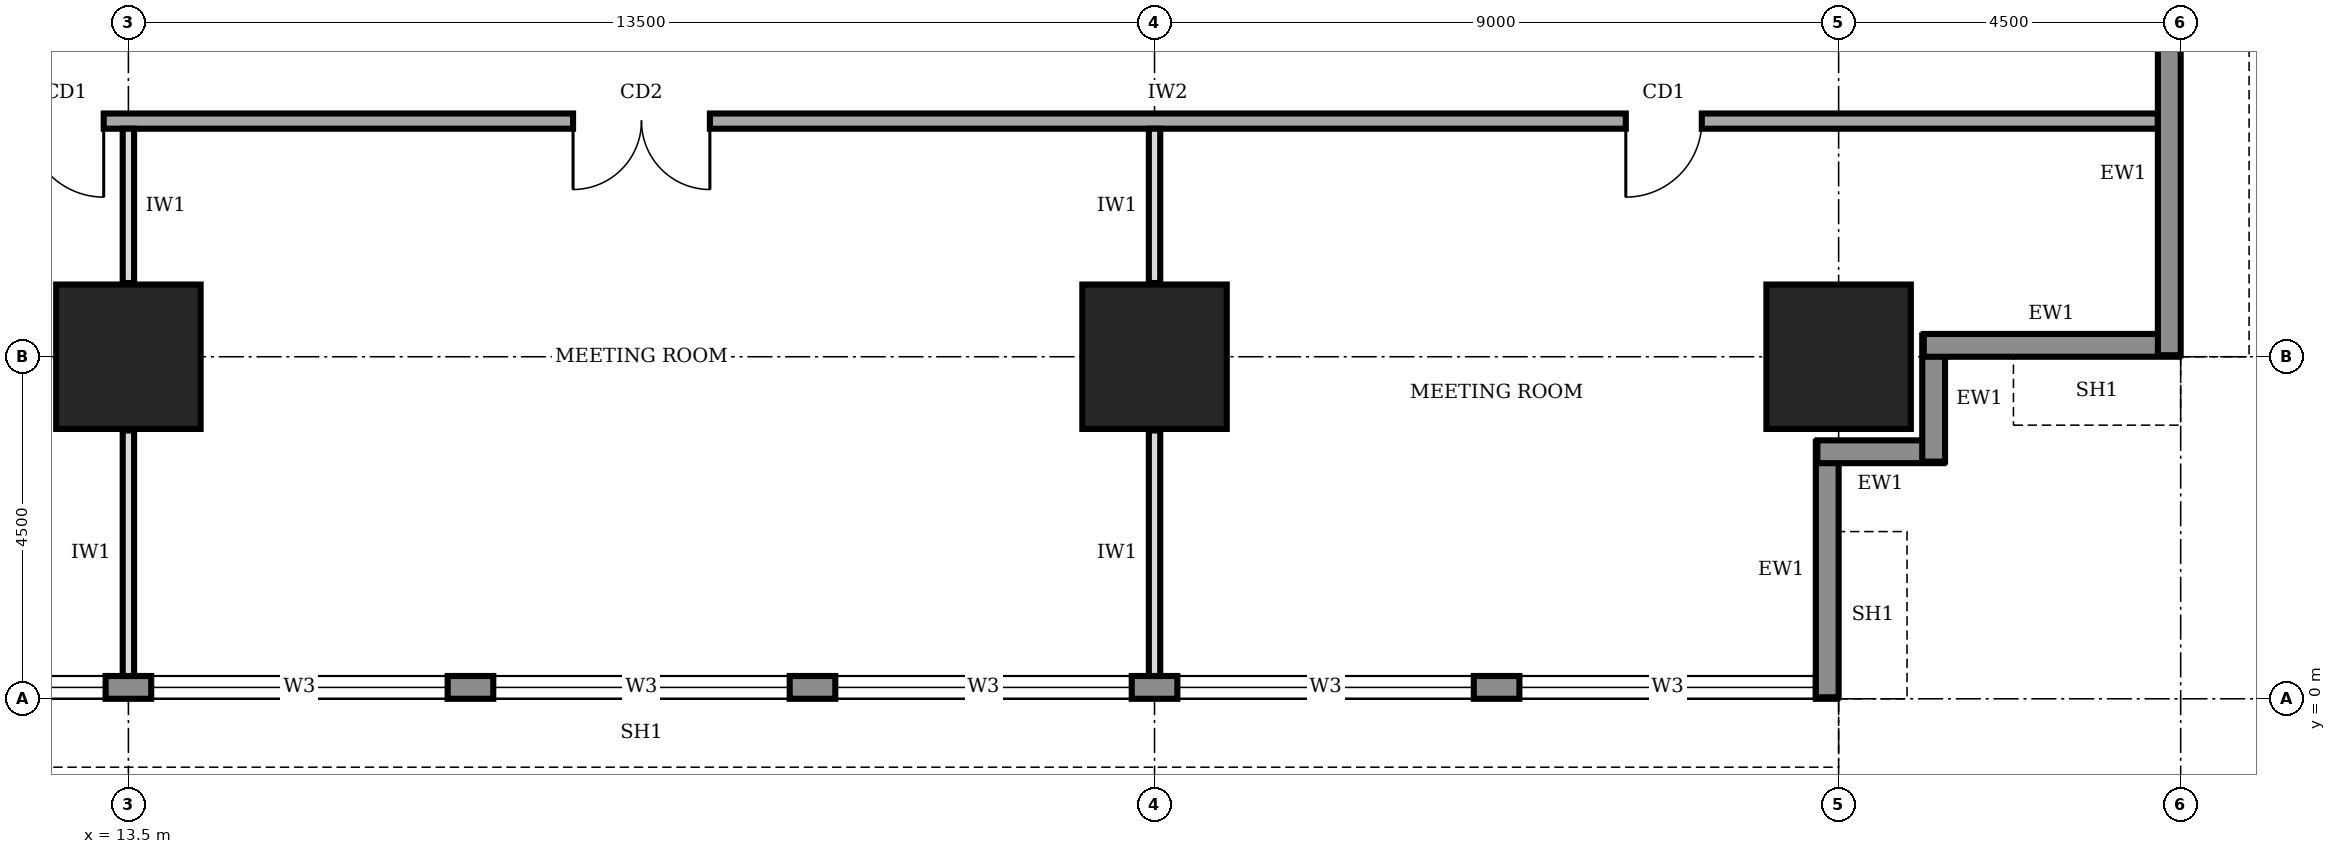
"""IFC4 building model, lengths in metres.
Left out: names, types, materials, properties, quantities, classifications, styles, units other than length and angle.
Written with IfcOpenShell. Run it as: python <this file> out.ifc"""

import sys

from ifc_helpers import new_model, si_unit, direction, frame, frame_2d, origin, origin_2d, place, context, subcontext, project, spatial, rectangle, extrude, element, fill, save


model = new_model("IFC4")
c1 = context("Model", 3, precision=1e-05, world=origin(), true_north=direction((0.0, 1.0)))
c2 = subcontext(c1, "Body", "Model", "MODEL_VIEW")
j1 = project(units=[si_unit("LENGTHUNIT", "METRE"), si_unit("PLANEANGLEUNIT", "RADIAN")], contexts=[c1])
p1 = place(None, origin())
s1 = spatial("IfcSite", under=j1, at=p1, CompositionType="ELEMENT")
p2 = place(p1, origin())
s2 = spatial("IfcBuilding", under=s1, at=p2, CompositionType="ELEMENT")
p3 = place(p2, frame((0.0, 0.0, 85.0)))
s3 = spatial("IfcBuildingStorey", under=s2, at=p3, CompositionType="ELEMENT", Elevation=85.0)
for number, where, z_axis, x_axis in (
    (1, (13.5, 4.5, 0.0), (0.0, 0.0, 1.0), (1.0, 0.0, 0.0)),
    (2, (27.0, 4.5, 0.0), (0.0, 0.0, 1.0), (1.0, 0.0, 0.0)),
    (3, (36.0, 4.5, 0.0), (0.0, 0.0, 1.0), (1.0, 0.0, 0.0)),
):
    element("IfcColumn", number, at=place(p3, frame(where, z_axis=z_axis, x_axis=x_axis)), inside=s3, PredefinedType="COLUMN", context=c2, shape_type="SweptSolid", body=[
        extrude(rectangle(XDim=1.9, YDim=1.9, at=origin_2d()), origin(), (0.0, 0.0, 1.0), 4.0),
    ])
p4 = place(p3, frame((4.52, 0.15, 0.0), z_axis=(0.0, 0.0, 1.0), x_axis=(1.0, 0.0, 0.0)))
e4 = element("IfcWall", 4, at=p4, inside=s3, PredefinedType="STANDARD", context=c2, shape_type="SweptSolid", body=[
    extrude(rectangle(XDim=31.46, YDim=0.3, at=frame_2d((15.73, 0.0))), origin(), (0.0, 0.0, 1.0), 3.75),
])
p5 = place(p4, frame((4.78, 0.0, 0.95)))
e5 = element("IfcOpeningElement", 5, at=p5, cuts=e4, PredefinedType="OPENING", context=c2, shape_type="SweptSolid", body=[
    extrude(rectangle(XDim=3.9, YDim=1.8, at=frame_2d((1.95, 0.9))), frame((0.0, 0.16, 0.0), z_axis=(0.0, -1.0, 0.0), x_axis=(1.0, 0.0, 0.0)), (0.0, 0.0, 1.0), 0.32),
])
p6 = place(p4, frame((9.28, 0.0, 0.95)))
e6 = element("IfcOpeningElement", 6, at=p6, cuts=e4, PredefinedType="OPENING", context=c2, shape_type="SweptSolid", body=[
    extrude(rectangle(XDim=3.9, YDim=1.8, at=frame_2d((1.95, 0.9))), frame((0.0, 0.16, 0.0), z_axis=(0.0, -1.0, 0.0), x_axis=(1.0, 0.0, 0.0)), (0.0, 0.0, 1.0), 0.32),
])
p7 = place(p4, frame((13.78, 0.0, 0.95)))
e7 = element("IfcOpeningElement", 7, at=p7, cuts=e4, PredefinedType="OPENING", context=c2, shape_type="SweptSolid", body=[
    extrude(rectangle(XDim=3.9, YDim=1.8, at=frame_2d((1.95, 0.9))), frame((0.0, 0.16, 0.0), z_axis=(0.0, -1.0, 0.0), x_axis=(1.0, 0.0, 0.0)), (0.0, 0.0, 1.0), 0.32),
])
p8 = place(p4, frame((18.28, 0.0, 0.95)))
e8 = element("IfcOpeningElement", 8, at=p8, cuts=e4, PredefinedType="OPENING", context=c2, shape_type="SweptSolid", body=[
    extrude(rectangle(XDim=3.9, YDim=1.8, at=frame_2d((1.95, 0.9))), frame((0.0, 0.16, 0.0), z_axis=(0.0, -1.0, 0.0), x_axis=(1.0, 0.0, 0.0)), (0.0, 0.0, 1.0), 0.32),
])
p9 = place(p4, frame((22.78, 0.0, 0.95)))
e9 = element("IfcOpeningElement", 9, at=p9, cuts=e4, PredefinedType="OPENING", context=c2, shape_type="SweptSolid", body=[
    extrude(rectangle(XDim=3.9, YDim=1.8, at=frame_2d((1.95, 0.9))), frame((0.0, 0.16, 0.0), z_axis=(0.0, -1.0, 0.0), x_axis=(1.0, 0.0, 0.0)), (0.0, 0.0, 1.0), 0.32),
])
p10 = place(p4, frame((27.28, 0.0, 0.95)))
e10 = element("IfcOpeningElement", 10, at=p10, cuts=e4, PredefinedType="OPENING", context=c2, shape_type="SweptSolid", body=[
    extrude(rectangle(XDim=3.9, YDim=1.8, at=frame_2d((1.95, 0.9))), frame((0.0, 0.16, 0.0), z_axis=(0.0, -1.0, 0.0), x_axis=(1.0, 0.0, 0.0)), (0.0, 0.0, 1.0), 0.32),
])
p11 = place(p3, frame((35.85, 0.02, 0.0), z_axis=(0.0, 0.0, 1.0), x_axis=(0.0, 1.0, 0.0)))
e11 = element("IfcWall", 11, at=p11, inside=s3, PredefinedType="STANDARD", context=c2, shape_type="SweptSolid", body=[
    extrude(rectangle(XDim=3.36, YDim=0.3, at=frame_2d((1.68, 0.0))), origin(), (0.0, 0.0, 1.0), 2.85),
])
for number, where, z_axis, x_axis in (
    (12, (35.72, 3.25, 0.0), (0.0, 0.0, 1.0), (1.0, 0.0, 0.0)),
    (13, (37.25, 3.12, 0.0), (0.0, 0.0, 1.0), (0.0, 1.0, 0.0)),
):
    element("IfcWall", number, at=place(p3, frame(where, z_axis=z_axis, x_axis=x_axis)), inside=s3, PredefinedType="STANDARD", context=c2, shape_type="SweptSolid", body=[
        extrude(rectangle(XDim=1.66, YDim=0.3, at=frame_2d((0.83, 0.0))), origin(), (0.0, 0.0, 1.0), 3.75),
    ])
p12 = place(p3, frame((37.12, 4.65, 0.0), z_axis=(0.0, 0.0, 1.0), x_axis=(1.0, 0.0, 0.0)))
e14 = element("IfcWall", 14, at=p12, inside=s3, PredefinedType="STANDARD", context=c2, shape_type="SweptSolid", body=[
    extrude(rectangle(XDim=3.36, YDim=0.3, at=frame_2d((1.68, 0.0))), origin(), (0.0, 0.0, 1.0), 2.85),
])
p13 = place(p3, frame((40.35, 4.52, 0.0), z_axis=(0.0, 0.0, 1.0), x_axis=(0.0, 1.0, 0.0)))
e15 = element("IfcWall", 15, at=p13, inside=s3, PredefinedType="STANDARD", context=c2, shape_type="SweptSolid", body=[
    extrude(rectangle(XDim=31.46, YDim=0.3, at=frame_2d((15.73, 0.0))), origin(), (0.0, 0.0, 1.0), 3.75),
])
p14 = place(p13, frame((4.78, 0.0, 0.95)))
e16 = element("IfcOpeningElement", 16, at=p14, cuts=e15, PredefinedType="OPENING", context=c2, shape_type="SweptSolid", body=[
    extrude(rectangle(XDim=3.9, YDim=1.8, at=frame_2d((1.95, 0.9))), frame((0.0, 0.16, 0.0), z_axis=(0.0, -1.0, 0.0), x_axis=(1.0, 0.0, 0.0)), (0.0, 0.0, 1.0), 0.32),
])
p15 = place(p13, frame((9.28, 0.0, 0.95)))
e17 = element("IfcOpeningElement", 17, at=p15, cuts=e15, PredefinedType="OPENING", context=c2, shape_type="SweptSolid", body=[
    extrude(rectangle(XDim=3.9, YDim=1.8, at=frame_2d((1.95, 0.9))), frame((0.0, 0.16, 0.0), z_axis=(0.0, -1.0, 0.0), x_axis=(1.0, 0.0, 0.0)), (0.0, 0.0, 1.0), 0.32),
])
p16 = place(p13, frame((13.78, 0.0, 0.95)))
e18 = element("IfcOpeningElement", 18, at=p16, cuts=e15, PredefinedType="OPENING", context=c2, shape_type="SweptSolid", body=[
    extrude(rectangle(XDim=3.9, YDim=1.8, at=frame_2d((1.95, 0.9))), frame((0.0, 0.16, 0.0), z_axis=(0.0, -1.0, 0.0), x_axis=(1.0, 0.0, 0.0)), (0.0, 0.0, 1.0), 0.32),
])
p17 = place(p13, frame((18.28, 0.0, 0.95)))
e19 = element("IfcOpeningElement", 19, at=p17, cuts=e15, PredefinedType="OPENING", context=c2, shape_type="SweptSolid", body=[
    extrude(rectangle(XDim=3.9, YDim=1.8, at=frame_2d((1.95, 0.9))), frame((0.0, 0.16, 0.0), z_axis=(0.0, -1.0, 0.0), x_axis=(1.0, 0.0, 0.0)), (0.0, 0.0, 1.0), 0.32),
])
p18 = place(p13, frame((22.78, 0.0, 0.95)))
e20 = element("IfcOpeningElement", 20, at=p18, cuts=e15, PredefinedType="OPENING", context=c2, shape_type="SweptSolid", body=[
    extrude(rectangle(XDim=3.9, YDim=1.8, at=frame_2d((1.95, 0.9))), frame((0.0, 0.16, 0.0), z_axis=(0.0, -1.0, 0.0), x_axis=(1.0, 0.0, 0.0)), (0.0, 0.0, 1.0), 0.32),
])
p19 = place(p13, frame((27.28, 0.0, 0.95)))
e21 = element("IfcOpeningElement", 21, at=p19, cuts=e15, PredefinedType="OPENING", context=c2, shape_type="SweptSolid", body=[
    extrude(rectangle(XDim=3.9, YDim=1.8, at=frame_2d((1.95, 0.9))), frame((0.0, 0.16, 0.0), z_axis=(0.0, -1.0, 0.0), x_axis=(1.0, 0.0, 0.0)), (0.0, 0.0, 1.0), 0.32),
])
p20 = place(p3, frame((11.9, 7.6, 0.0), z_axis=(0.0, 0.0, 1.0), x_axis=(1.0, 0.0, 0.0)))
e22 = element("IfcWall", 22, at=p20, inside=s3, PredefinedType="SOLIDWALL", context=c2, shape_type="SweptSolid", body=[
    extrude(rectangle(XDim=28.3, YDim=0.2, at=frame_2d((14.15, 0.0))), origin(), (0.0, 0.0, 1.0), 3.75),
])
p21 = place(p20, frame((0.275, 0.0, 0.0)))
e23 = element("IfcOpeningElement", 23, at=p21, cuts=e22, PredefinedType="OPENING", context=c2, shape_type="SweptSolid", body=[
    extrude(rectangle(XDim=1.0, YDim=2.1, at=frame_2d((0.5, 1.05))), frame((0.0, 0.11, 0.0), z_axis=(0.0, -1.0, 0.0), x_axis=(1.0, 0.0, 0.0)), (0.0, 0.0, 1.0), 0.22),
])
p22 = place(p20, frame((7.45, 0.0, 0.0)))
e24 = element("IfcOpeningElement", 24, at=p22, cuts=e22, PredefinedType="OPENING", context=c2, shape_type="SweptSolid", body=[
    extrude(rectangle(XDim=1.8, YDim=2.1, at=frame_2d((0.9, 1.05))), frame((0.0, 0.11, 0.0), z_axis=(0.0, -1.0, 0.0), x_axis=(1.0, 0.0, 0.0)), (0.0, 0.0, 1.0), 0.22),
])
p23 = place(p20, frame((21.3, 0.0, 0.0)))
e25 = element("IfcOpeningElement", 25, at=p23, cuts=e22, PredefinedType="OPENING", context=c2, shape_type="SweptSolid", body=[
    extrude(rectangle(XDim=1.0, YDim=2.1, at=frame_2d((0.5, 1.05))), frame((0.0, 0.11, 0.0), z_axis=(0.0, -1.0, 0.0), x_axis=(1.0, 0.0, 0.0)), (0.0, 0.0, 1.0), 0.22),
])
p24 = place(p3, frame((13.5, 0.3, 0.0), z_axis=(0.0, 0.0, 1.0), x_axis=(0.0, 1.0, 0.0)))
e26 = element("IfcWall", 26, at=p24, inside=s3, PredefinedType="PARTITIONING", context=c2, shape_type="SweptSolid", body=[
    extrude(rectangle(XDim=3.23, YDim=0.15, at=frame_2d((1.615, 0.0))), origin(), (0.0, 0.0, 1.0), 2.85),
])
p25 = place(p3, frame((13.5, 5.47, 0.0), z_axis=(0.0, 0.0, 1.0), x_axis=(0.0, 1.0, 0.0)))
e27 = element("IfcWall", 27, at=p25, inside=s3, PredefinedType="PARTITIONING", context=c2, shape_type="SweptSolid", body=[
    extrude(rectangle(XDim=2.03, YDim=0.15, at=frame_2d((1.015, 0.0))), origin(), (0.0, 0.0, 1.0), 2.85),
])
p26 = place(p3, frame((27.0, 0.3, 0.0), z_axis=(0.0, 0.0, 1.0), x_axis=(0.0, 1.0, 0.0)))
e28 = element("IfcWall", 28, at=p26, inside=s3, PredefinedType="PARTITIONING", context=c2, shape_type="SweptSolid", body=[
    extrude(rectangle(XDim=3.23, YDim=0.15, at=frame_2d((1.615, 0.0))), origin(), (0.0, 0.0, 1.0), 2.85),
])
p27 = place(p3, frame((27.0, 5.47, 0.0), z_axis=(0.0, 0.0, 1.0), x_axis=(0.0, 1.0, 0.0)))
e29 = element("IfcWall", 29, at=p27, inside=s3, PredefinedType="PARTITIONING", context=c2, shape_type="SweptSolid", body=[
    extrude(rectangle(XDim=2.03, YDim=0.15, at=frame_2d((1.015, 0.0))), origin(), (0.0, 0.0, 1.0), 2.85),
])
p28 = place(p5, origin())
e30 = element("IfcWindow", 30, at=p28, inside=s3, PartitioningType="SINGLE_PANEL", PredefinedType="WINDOW", context=c2, shape_type="SweptSolid", body=[
    extrude(rectangle(XDim=3.9, YDim=1.8, at=frame_2d((1.95, 0.9))), frame((0.0, 0.03, 0.0), z_axis=(0.0, -1.0, 0.0), x_axis=(1.0, 0.0, 0.0)), (0.0, 0.0, 1.0), 0.06),
])
fill(e5, e30)
p29 = place(p6, origin())
e31 = element("IfcWindow", 31, at=p29, inside=s3, PartitioningType="SINGLE_PANEL", PredefinedType="WINDOW", context=c2, shape_type="SweptSolid", body=[
    extrude(rectangle(XDim=3.9, YDim=1.8, at=frame_2d((1.95, 0.9))), frame((0.0, 0.03, 0.0), z_axis=(0.0, -1.0, 0.0), x_axis=(1.0, 0.0, 0.0)), (0.0, 0.0, 1.0), 0.06),
])
fill(e6, e31)
p30 = place(p7, origin())
e32 = element("IfcWindow", 32, at=p30, inside=s3, PartitioningType="SINGLE_PANEL", PredefinedType="WINDOW", context=c2, shape_type="SweptSolid", body=[
    extrude(rectangle(XDim=3.9, YDim=1.8, at=frame_2d((1.95, 0.9))), frame((0.0, 0.03, 0.0), z_axis=(0.0, -1.0, 0.0), x_axis=(1.0, 0.0, 0.0)), (0.0, 0.0, 1.0), 0.06),
])
fill(e7, e32)
p31 = place(p8, origin())
e33 = element("IfcWindow", 33, at=p31, inside=s3, PartitioningType="SINGLE_PANEL", PredefinedType="WINDOW", context=c2, shape_type="SweptSolid", body=[
    extrude(rectangle(XDim=3.9, YDim=1.8, at=frame_2d((1.95, 0.9))), frame((0.0, 0.03, 0.0), z_axis=(0.0, -1.0, 0.0), x_axis=(1.0, 0.0, 0.0)), (0.0, 0.0, 1.0), 0.06),
])
fill(e8, e33)
p32 = place(p9, origin())
e34 = element("IfcWindow", 34, at=p32, inside=s3, PartitioningType="SINGLE_PANEL", PredefinedType="WINDOW", context=c2, shape_type="SweptSolid", body=[
    extrude(rectangle(XDim=3.9, YDim=1.8, at=frame_2d((1.95, 0.9))), frame((0.0, 0.03, 0.0), z_axis=(0.0, -1.0, 0.0), x_axis=(1.0, 0.0, 0.0)), (0.0, 0.0, 1.0), 0.06),
])
fill(e9, e34)
p33 = place(p10, origin())
e35 = element("IfcWindow", 35, at=p33, inside=s3, PartitioningType="SINGLE_PANEL", PredefinedType="WINDOW", context=c2, shape_type="SweptSolid", body=[
    extrude(rectangle(XDim=3.9, YDim=1.8, at=frame_2d((1.95, 0.9))), frame((0.0, 0.03, 0.0), z_axis=(0.0, -1.0, 0.0), x_axis=(1.0, 0.0, 0.0)), (0.0, 0.0, 1.0), 0.06),
])
fill(e10, e35)
p34 = place(p21, frame((1.0, 0.0, 0.0), z_axis=(0.0, 0.0, 1.0), x_axis=(-1.0, 0.0, 0.0)))
e36 = element("IfcDoor", 36, at=p34, inside=s3, OperationType="SINGLE_SWING_LEFT", PredefinedType="DOOR", context=c2, shape_type="SweptSolid", body=[
    extrude(rectangle(XDim=1.0, YDim=2.1, at=frame_2d((0.5, 1.05))), frame((0.0, 0.025, 0.0), z_axis=(0.0, -1.0, 0.0), x_axis=(1.0, 0.0, 0.0)), (0.0, 0.0, 1.0), 0.05),
])
fill(e23, e36)
p35 = place(p22, frame((1.8, 0.0, 0.0), z_axis=(0.0, 0.0, 1.0), x_axis=(-1.0, 0.0, 0.0)))
e37 = element("IfcDoor", 37, at=p35, inside=s3, OperationType="DOUBLE_DOOR_SINGLE_SWING", PredefinedType="DOOR", context=c2, shape_type="SweptSolid", body=[
    extrude(rectangle(XDim=1.8, YDim=2.1, at=frame_2d((0.9, 1.05))), frame((0.0, 0.025, 0.0), z_axis=(0.0, -1.0, 0.0), x_axis=(1.0, 0.0, 0.0)), (0.0, 0.0, 1.0), 0.05),
])
fill(e24, e37)
p36 = place(p23, frame((1.0, 0.0, 0.0), z_axis=(0.0, 0.0, 1.0), x_axis=(-1.0, 0.0, 0.0)))
e38 = element("IfcDoor", 38, at=p36, inside=s3, OperationType="SINGLE_SWING_RIGHT", PredefinedType="DOOR", context=c2, shape_type="SweptSolid", body=[
    extrude(rectangle(XDim=1.0, YDim=2.1, at=frame_2d((0.5, 1.05))), frame((0.0, 0.025, 0.0), z_axis=(0.0, -1.0, 0.0), x_axis=(1.0, 0.0, 0.0)), (0.0, 0.0, 1.0), 0.05),
])
fill(e25, e38)
save(model, sys.argv[1])
